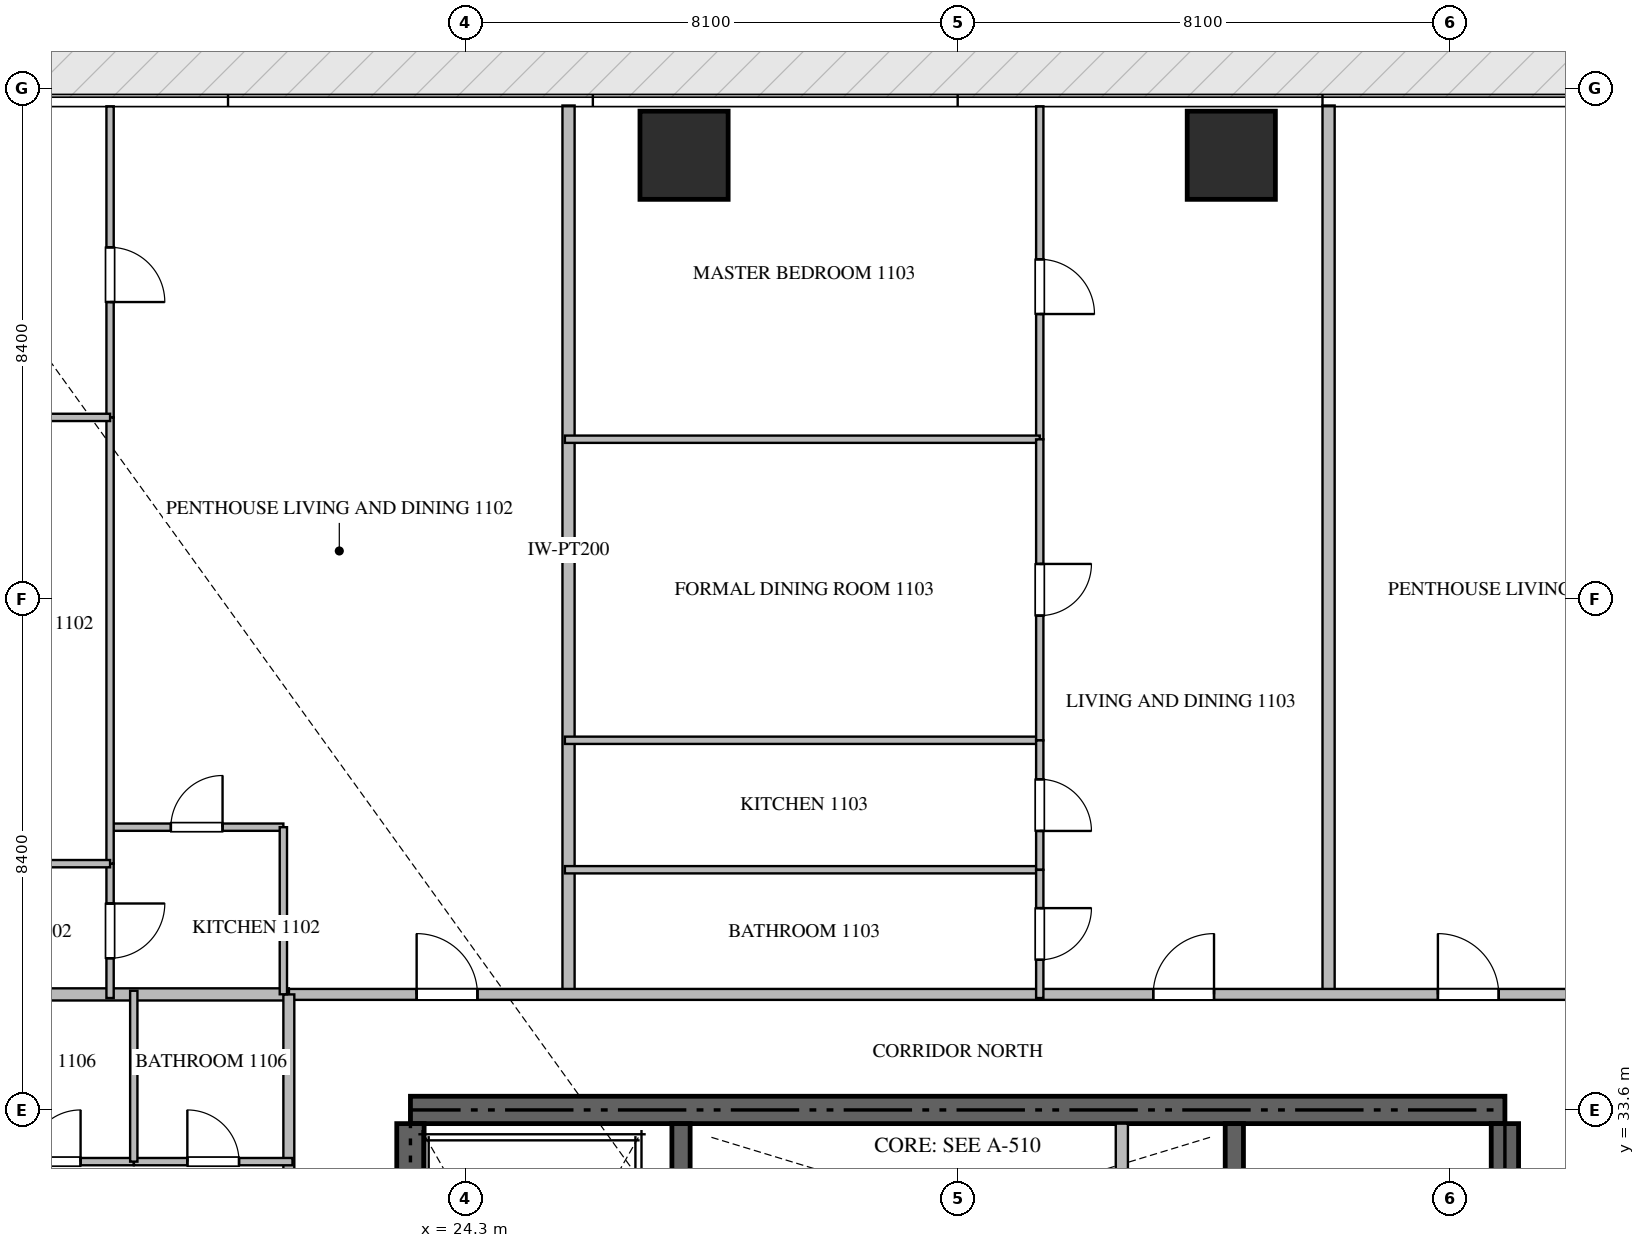
"""IFC4 building model, lengths in metres.
Left out: names, types, materials, properties, quantities, classifications, styles, units other than length and angle.
Written with IfcOpenShell. Run it as: python <this file> out.ifc"""

import sys

from ifc_helpers import new_model, si_unit, direction, frame, frame_2d, origin, origin_2d, place, context, subcontext, project, spatial, rectangle, extrude, source, transform, mapped, element, fill, save


model = new_model("IFC4")
c1 = context("Model", 3, precision=1e-05, world=origin(), true_north=direction((0.0, 1.0)))
c2 = subcontext(c1, "Body", "Model", "MODEL_VIEW")
j1 = project(units=[si_unit("LENGTHUNIT", "METRE"), si_unit("PLANEANGLEUNIT", "RADIAN")], contexts=[c1])
p1 = place(None, origin())
s1 = spatial("IfcSite", under=j1, at=p1, CompositionType="ELEMENT")
p2 = place(p1, origin())
s2 = spatial("IfcBuilding", under=s1, at=p2, CompositionType="ELEMENT")
p3 = place(p2, frame((0.0, 0.0, 49.2)))
s3 = spatial("IfcBuildingStorey", under=s2, at=p3, CompositionType="ELEMENT", Elevation=49.2)
p4 = place(p3, frame((41.4, 33.6, -0.26), z_axis=(0.0, 0.0, 1.0), x_axis=(-1.0, 0.0, 0.0)))
e1 = element("IfcWall", 1, at=p4, inside=s3, PredefinedType="SHEAR", context=c2, shape_type="SweptSolid", body=[
    extrude(rectangle(XDim=18.0, YDim=0.45, at=frame_2d((9.0, 0.0))), origin(), (0.0, 0.0, 1.0), 3.748),
])
p5 = place(p3, frame((23.4, 24.25, -0.26), z_axis=(0.0, 0.0, 1.0), x_axis=(0.0, 1.0, 0.0)))
e2 = element("IfcWall", 2, at=p5, inside=s3, PredefinedType="SHEAR", context=c2, shape_type="SweptSolid", body=[
    extrude(rectangle(XDim=9.125, YDim=0.45, at=frame_2d((4.562, 0.0))), origin(), (0.0, 0.0, 1.0), 3.748),
])
p6 = place(p3, frame((41.4, 27.75, -0.26), z_axis=(0.0, 0.0, 1.0), x_axis=(0.0, 1.0, 0.0)))
e3 = element("IfcWall", 3, at=p6, inside=s3, PredefinedType="SHEAR", context=c2, shape_type="SweptSolid", body=[
    extrude(rectangle(XDim=5.625, YDim=0.45, at=frame_2d((2.812, 0.0))), origin(), (0.0, 0.0, 1.0), 3.748),
])
p7 = place(p3, frame((27.85, 23.55, -0.26), z_axis=(0.0, 0.0, 1.0), x_axis=(0.0, 1.0, 0.0)))
e4 = element("IfcWall", 4, at=p7, inside=s3, PredefinedType="SHEAR", context=c2, shape_type="SweptSolid", body=[
    extrude(rectangle(XDim=9.825, YDim=0.3, at=frame_2d((4.913, 0.0))), origin(), (0.0, 0.0, 1.0), 3.748),
])
p8 = place(p3, frame((36.95, 27.05, -0.26), z_axis=(0.0, 0.0, 1.0), x_axis=(0.0, 1.0, 0.0)))
e5 = element("IfcWall", 5, at=p8, inside=s3, PredefinedType="SHEAR", context=c2, shape_type="SweptSolid", body=[
    extrude(rectangle(XDim=6.325, YDim=0.3, at=frame_2d((3.163, 0.0))), origin(), (0.0, 0.0, 1.0), 3.748),
])
m1 = source(origin(), c2, "Body", "SweptSolid", [
    extrude(rectangle(XDim=1.45, YDim=1.45, at=origin_2d()), origin(), (0.0, 0.0, 1.0), 3.75),
])
for number, where, z_axis, x_axis in (
    (6, (27.9, 49.3, -0.26), (0.0, 0.0, 1.0), (1.0, 0.0, 0.0)),
    (7, (36.9, 49.3, -0.26), (0.0, 0.0, 1.0), (1.0, 0.0, 0.0)),
):
    element("IfcColumn", number, at=place(p3, frame(where, z_axis=z_axis, x_axis=x_axis)), inside=s3, PredefinedType="COLUMN", context=c2, shape_type="MappedRepresentation", body=[
        mapped(m1, transform((0.0, 0.0, 0.0), scale=1.0)),
    ])
p9 = place(p3, frame((35.1, 30.75, 0.0), z_axis=(0.0, 0.0, 1.0), x_axis=(0.0, 1.0, 0.0)))
e8 = element("IfcWall", 8, at=p9, inside=s3, PredefinedType="STANDARD", context=c2, shape_type="SweptSolid", body=[
    extrude(rectangle(XDim=2.625, YDim=0.2, at=frame_2d((1.312, 0.0))), origin(), (0.0, 0.0, 1.0), 3.49),
])
for number, where, z_axis, x_axis in (
    (9, (26.0, 35.5, 0.0), (0.0, 0.0, 1.0), (0.0, 1.0, 0.0)),
    (10, (38.5, 35.5, 0.0), (0.0, 0.0, 1.0), (0.0, 1.0, 0.0)),
):
    element("IfcWall", number, at=place(p3, frame(where, z_axis=z_axis, x_axis=x_axis)), inside=s3, PredefinedType="PARTITIONING", context=c2, shape_type="SweptSolid", body=[
        extrude(rectangle(XDim=14.618, YDim=0.2, at=frame_2d((7.309, 0.0))), origin(), (0.0, 0.0, 1.0), 3.49),
    ])
p10 = place(p3, frame((6.082, 35.5, 0.0), z_axis=(0.0, 0.0, 1.0), x_axis=(1.0, 0.0, 0.0)))
e11 = element("IfcWall", 11, at=p10, inside=s3, PredefinedType="PARTITIONING", context=c2, shape_type="SweptSolid", body=[
    extrude(rectangle(XDim=15.318, YDim=0.2, at=frame_2d((7.659, 0.0))), origin(), (0.0, 0.0, 1.0), 3.49),
])
p11 = place(p3, frame((21.402, 35.5, 0.0), z_axis=(0.0, 0.0, 1.0), x_axis=(1.0, 0.0, 0.0)))
e12 = element("IfcWall", 12, at=p11, inside=s3, PredefinedType="PARTITIONING", context=c2, shape_type="SweptSolid", body=[
    extrude(rectangle(XDim=21.996, YDim=0.18, at=frame_2d((10.998, 0.0))), origin(), (0.0, 0.0, 1.0), 3.49),
])
p12 = place(p11, frame((2.1, 0.0, 0.0)))
e13 = element("IfcOpeningElement", 13, at=p12, cuts=e12, PredefinedType="OPENING", context=c2, shape_type="SweptSolid", body=[
    extrude(rectangle(XDim=1.0, YDim=2.15, at=frame_2d((0.5, 1.075))), frame((0.0, 0.1, 0.0), z_axis=(0.0, -1.0, 0.0), x_axis=(1.0, 0.0, 0.0)), (0.0, 0.0, 1.0), 0.2),
])
p13 = place(p11, frame((14.214, 0.0, 0.0)))
e14 = element("IfcOpeningElement", 14, at=p13, cuts=e12, PredefinedType="OPENING", context=c2, shape_type="SweptSolid", body=[
    extrude(rectangle(XDim=1.0, YDim=2.15, at=frame_2d((0.5, 1.075))), frame((0.0, 0.1, 0.0), z_axis=(0.0, -1.0, 0.0), x_axis=(1.0, 0.0, 0.0)), (0.0, 0.0, 1.0), 0.2),
])
p14 = place(p11, frame((18.896, 0.0, 0.0)))
e15 = element("IfcOpeningElement", 15, at=p14, cuts=e12, PredefinedType="OPENING", context=c2, shape_type="SweptSolid", body=[
    extrude(rectangle(XDim=1.0, YDim=2.15, at=frame_2d((0.5, 1.075))), frame((0.0, 0.1, 0.0), z_axis=(0.0, -1.0, 0.0), x_axis=(1.0, 0.0, 0.0)), (0.0, 0.0, 1.0), 0.2),
])
p15 = place(p3, frame((21.4, 14.9, 0.0), z_axis=(0.0, 0.0, 1.0), x_axis=(0.0, 1.0, 0.0)))
e16 = element("IfcWall", 16, at=p15, inside=s3, PredefinedType="PARTITIONING", context=c2, shape_type="SweptSolid", body=[
    extrude(rectangle(XDim=20.6, YDim=0.18, at=frame_2d((10.3, 0.0))), origin(), (0.0, 0.0, 1.0), 3.49),
])
p16 = place(p15, frame((8.8, 0.0, 0.0)))
e17 = element("IfcOpeningElement", 17, at=p16, cuts=e16, PredefinedType="OPENING", context=c2, shape_type="SweptSolid", body=[
    extrude(rectangle(XDim=1.0, YDim=2.15, at=frame_2d((0.5, 1.075))), frame((0.0, 0.1, 0.0), z_axis=(0.0, -1.0, 0.0), x_axis=(1.0, 0.0, 0.0)), (0.0, 0.0, 1.0), 0.2),
])
p17 = place(p15, frame((13.877, 0.0, 0.0)))
e18 = element("IfcOpeningElement", 18, at=p17, cuts=e16, PredefinedType="OPENING", context=c2, shape_type="SweptSolid", body=[
    extrude(rectangle(XDim=1.0, YDim=2.15, at=frame_2d((0.5, 1.075))), frame((0.0, 0.1, 0.0), z_axis=(0.0, -1.0, 0.0), x_axis=(1.0, 0.0, 0.0)), (0.0, 0.0, 1.0), 0.2),
])
p18 = place(p3, frame((18.46, 38.25, 0.0), z_axis=(0.0, 0.0, 1.0), x_axis=(1.0, 0.0, 0.0)))
e19 = element("IfcWall", 19, at=p18, inside=s3, PredefinedType="PARTITIONING", context=c2, shape_type="SweptSolid", body=[
    extrude(rectangle(XDim=2.85, YDim=0.12, at=frame_2d((1.425, 0.0))), origin(), (0.0, 0.0, 1.0), 3.49),
])
p19 = place(p18, frame((1.0, 0.0, 0.0)))
e20 = element("IfcOpeningElement", 20, at=p19, cuts=e19, PredefinedType="OPENING", context=c2, shape_type="SweptSolid", body=[
    extrude(rectangle(XDim=0.85, YDim=2.1, at=frame_2d((0.425, 1.05))), frame((0.0, 0.07, 0.0), z_axis=(0.0, -1.0, 0.0), x_axis=(1.0, 0.0, 0.0)), (0.0, 0.0, 1.0), 0.14),
])
p20 = place(p3, frame((21.31, 38.25, 0.0), z_axis=(0.0, 0.0, 1.0), x_axis=(0.0, -1.0, 0.0)))
e21 = element("IfcWall", 21, at=p20, inside=s3, PredefinedType="PARTITIONING", context=c2, shape_type="SweptSolid", body=[
    extrude(rectangle(XDim=2.748, YDim=0.12, at=frame_2d((1.374, 0.0))), origin(), (0.0, 0.0, 1.0), 3.49),
])
p21 = place(p3, frame((18.46, 37.65, 0.0), z_axis=(0.0, 0.0, 1.0), x_axis=(0.0, -1.0, 0.0)))
e22 = element("IfcWall", 22, at=p21, inside=s3, PredefinedType="PARTITIONING", context=c2, shape_type="SweptSolid", body=[
    extrude(rectangle(XDim=2.21, YDim=0.12, at=frame_2d((1.105, 0.0))), origin(), (0.0, 0.0, 1.0), 3.49),
])
p22 = place(p21, frame((0.655, 0.0, 0.0)))
e23 = element("IfcOpeningElement", 23, at=p22, cuts=e22, PredefinedType="OPENING", context=c2, shape_type="SweptSolid", body=[
    extrude(rectangle(XDim=0.9, YDim=2.1, at=frame_2d((0.45, 1.05))), frame((0.0, 0.07, 0.0), z_axis=(0.0, -1.0, 0.0), x_axis=(1.0, 0.0, 0.0)), (0.0, 0.0, 1.0), 0.14),
])
p23 = place(p3, frame((18.46, 50.105, 0.0), z_axis=(0.0, 0.0, 1.0), x_axis=(0.0, -1.0, 0.0)))
e24 = element("IfcWall", 24, at=p23, inside=s3, PredefinedType="PARTITIONING", context=c2, shape_type="SweptSolid", body=[
    extrude(rectangle(XDim=5.116, YDim=0.12, at=frame_2d((2.558, 0.0))), origin(), (0.0, 0.0, 1.0), 3.49),
])
p24 = place(p23, frame((2.319, 0.0, 0.0)))
e25 = element("IfcOpeningElement", 25, at=p24, cuts=e24, PredefinedType="OPENING", context=c2, shape_type="SweptSolid", body=[
    extrude(rectangle(XDim=0.9, YDim=2.1, at=frame_2d((0.45, 1.05))), frame((0.0, 0.07, 0.0), z_axis=(0.0, -1.0, 0.0), x_axis=(1.0, 0.0, 0.0)), (0.0, 0.0, 1.0), 0.14),
])
p25 = place(p3, frame((18.46, 44.987, 0.0), z_axis=(0.0, 0.0, 1.0), x_axis=(0.0, -1.0, 0.0)))
e26 = element("IfcWall", 26, at=p25, inside=s3, PredefinedType="PARTITIONING", context=c2, shape_type="SweptSolid", body=[
    extrude(rectangle(XDim=7.335, YDim=0.12, at=frame_2d((3.667, 0.0))), origin(), (0.0, 0.0, 1.0), 3.49),
])
p26 = place(p3, frame((13.31, 44.989, 0.0), z_axis=(0.0, 0.0, 1.0), x_axis=(1.0, 0.0, 0.0)))
e27 = element("IfcWall", 27, at=p26, inside=s3, PredefinedType="PARTITIONING", context=c2, shape_type="SweptSolid", body=[
    extrude(rectangle(XDim=5.15, YDim=0.12, at=frame_2d((2.575, 0.0))), origin(), (0.0, 0.0, 1.0), 3.49),
])
p27 = place(p3, frame((15.412, 37.65, 0.0), z_axis=(0.0, 0.0, 1.0), x_axis=(1.0, 0.0, 0.0)))
e28 = element("IfcWall", 28, at=p27, inside=s3, PredefinedType="PARTITIONING", context=c2, shape_type="SweptSolid", body=[
    extrude(rectangle(XDim=3.048, YDim=0.12, at=frame_2d((1.524, 0.0))), origin(), (0.0, 0.0, 1.0), 3.49),
])
p28 = place(p27, frame((1.099, 0.0, 0.0)))
e29 = element("IfcOpeningElement", 29, at=p28, cuts=e28, PredefinedType="OPENING", context=c2, shape_type="SweptSolid", body=[
    extrude(rectangle(XDim=0.85, YDim=2.1, at=frame_2d((0.425, 1.05))), frame((0.0, 0.07, 0.0), z_axis=(0.0, -1.0, 0.0), x_axis=(1.0, 0.0, 0.0)), (0.0, 0.0, 1.0), 0.14),
])
p29 = place(p3, frame((33.75, 50.105, 0.0), z_axis=(0.0, 0.0, 1.0), x_axis=(0.0, -1.0, 0.0)))
e30 = element("IfcWall", 30, at=p29, inside=s3, PredefinedType="PARTITIONING", context=c2, shape_type="SweptSolid", body=[
    extrude(rectangle(XDim=5.475, YDim=0.12, at=frame_2d((2.738, 0.0))), origin(), (0.0, 0.0, 1.0), 3.49),
])
p30 = place(p29, frame((2.516, 0.0, 0.0)))
e31 = element("IfcOpeningElement", 31, at=p30, cuts=e30, PredefinedType="OPENING", context=c2, shape_type="SweptSolid", body=[
    extrude(rectangle(XDim=0.9, YDim=2.1, at=frame_2d((0.45, 1.05))), frame((0.0, 0.07, 0.0), z_axis=(0.0, -1.0, 0.0), x_axis=(1.0, 0.0, 0.0)), (0.0, 0.0, 1.0), 0.14),
])
for number, where, z_axis, x_axis in (
    (32, (25.94, 44.63, 0.0), (0.0, 0.0, 1.0), (1.0, 0.0, 0.0)),
    (33, (25.94, 39.679, 0.0), (0.0, 0.0, 1.0), (1.0, 0.0, 0.0)),
    (34, (25.94, 37.55, 0.0), (0.0, 0.0, 1.0), (1.0, 0.0, 0.0)),
):
    element("IfcWall", number, at=place(p3, frame(where, z_axis=z_axis, x_axis=x_axis)), inside=s3, PredefinedType="PARTITIONING", context=c2, shape_type="SweptSolid", body=[
        extrude(rectangle(XDim=7.81, YDim=0.12, at=frame_2d((3.905, 0.0))), origin(), (0.0, 0.0, 1.0), 3.49),
    ])
p31 = place(p3, frame((33.75, 44.628, 0.0), z_axis=(0.0, 0.0, 1.0), x_axis=(0.0, -1.0, 0.0)))
e35 = element("IfcWall", 35, at=p31, inside=s3, PredefinedType="PARTITIONING", context=c2, shape_type="SweptSolid", body=[
    extrude(rectangle(XDim=4.949, YDim=0.12, at=frame_2d((2.475, 0.0))), origin(), (0.0, 0.0, 1.0), 3.49),
])
p32 = place(p31, frame((2.049, 0.0, 0.0)))
e36 = element("IfcOpeningElement", 36, at=p32, cuts=e35, PredefinedType="OPENING", context=c2, shape_type="SweptSolid", body=[
    extrude(rectangle(XDim=0.85, YDim=2.1, at=frame_2d((0.425, 1.05))), frame((0.0, 0.07, 0.0), z_axis=(0.0, -1.0, 0.0), x_axis=(1.0, 0.0, 0.0)), (0.0, 0.0, 1.0), 0.14),
])
p33 = place(p3, frame((33.75, 39.677, 0.0), z_axis=(0.0, 0.0, 1.0), x_axis=(0.0, -1.0, 0.0)))
e37 = element("IfcWall", 37, at=p33, inside=s3, PredefinedType="PARTITIONING", context=c2, shape_type="SweptSolid", body=[
    extrude(rectangle(XDim=2.127, YDim=0.12, at=frame_2d((1.063, 0.0))), origin(), (0.0, 0.0, 1.0), 3.49),
])
p34 = place(p33, frame((0.639, 0.0, 0.0)))
e38 = element("IfcOpeningElement", 38, at=p34, cuts=e37, PredefinedType="OPENING", context=c2, shape_type="SweptSolid", body=[
    extrude(rectangle(XDim=0.85, YDim=2.1, at=frame_2d((0.425, 1.05))), frame((0.0, 0.07, 0.0), z_axis=(0.0, -1.0, 0.0), x_axis=(1.0, 0.0, 0.0)), (0.0, 0.0, 1.0), 0.14),
])
p35 = place(p3, frame((33.75, 37.548, 0.0), z_axis=(0.0, 0.0, 1.0), x_axis=(0.0, -1.0, 0.0)))
e39 = element("IfcWall", 39, at=p35, inside=s3, PredefinedType="PARTITIONING", context=c2, shape_type="SweptSolid", body=[
    extrude(rectangle(XDim=2.108, YDim=0.12, at=frame_2d((1.054, 0.0))), origin(), (0.0, 0.0, 1.0), 3.49),
])
p36 = place(p35, frame((0.629, 0.0, 0.0)))
e40 = element("IfcOpeningElement", 40, at=p36, cuts=e39, PredefinedType="OPENING", context=c2, shape_type="SweptSolid", body=[
    extrude(rectangle(XDim=0.85, YDim=2.1, at=frame_2d((0.425, 1.05))), frame((0.0, 0.07, 0.0), z_axis=(0.0, -1.0, 0.0), x_axis=(1.0, 0.0, 0.0)), (0.0, 0.0, 1.0), 0.14),
])
p37 = place(p3, frame((16.25, 32.75, 0.0), z_axis=(0.0, 0.0, 1.0), x_axis=(1.0, 0.0, 0.0)))
e41 = element("IfcWall", 41, at=p37, inside=s3, PredefinedType="PARTITIONING", context=c2, shape_type="SweptSolid", body=[
    extrude(rectangle(XDim=2.6, YDim=0.12, at=frame_2d((1.3, 0.0))), origin(), (0.0, 0.0, 1.0), 3.49),
])
p38 = place(p37, frame((0.875, 0.0, 0.0)))
e42 = element("IfcOpeningElement", 42, at=p38, cuts=e41, PredefinedType="OPENING", context=c2, shape_type="SweptSolid", body=[
    extrude(rectangle(XDim=0.85, YDim=2.1, at=frame_2d((0.425, 1.05))), frame((0.0, 0.07, 0.0), z_axis=(0.0, -1.0, 0.0), x_axis=(1.0, 0.0, 0.0)), (0.0, 0.0, 1.0), 0.14),
])
p39 = place(p3, frame((18.852, 32.75, 0.0), z_axis=(0.0, 0.0, 1.0), x_axis=(1.0, 0.0, 0.0)))
e43 = element("IfcWall", 43, at=p39, inside=s3, PredefinedType="PARTITIONING", context=c2, shape_type="SweptSolid", body=[
    extrude(rectangle(XDim=2.608, YDim=0.12, at=frame_2d((1.304, 0.0))), origin(), (0.0, 0.0, 1.0), 3.49),
])
p40 = place(p39, frame((0.879, 0.0, 0.0)))
e44 = element("IfcOpeningElement", 44, at=p40, cuts=e43, PredefinedType="OPENING", context=c2, shape_type="SweptSolid", body=[
    extrude(rectangle(XDim=0.85, YDim=2.1, at=frame_2d((0.425, 1.05))), frame((0.0, 0.07, 0.0), z_axis=(0.0, -1.0, 0.0), x_axis=(1.0, 0.0, 0.0)), (0.0, 0.0, 1.0), 0.14),
])
p41 = place(p3, frame((18.85, 32.75, 0.0), z_axis=(0.0, 0.0, 1.0), x_axis=(0.0, 1.0, 0.0)))
e45 = element("IfcWall", 45, at=p41, inside=s3, PredefinedType="PARTITIONING", context=c2, shape_type="SweptSolid", body=[
    extrude(rectangle(XDim=2.81, YDim=0.12, at=frame_2d((1.405, 0.0))), origin(), (0.0, 0.0, 1.0), 3.49),
])
m2 = source(origin(), c2, "Body", "SweptSolid", [
    extrude(rectangle(XDim=1.0, YDim=2.15, at=frame_2d((0.5, 1.075))), frame((0.0, 0.025, 0.0), z_axis=(0.0, -1.0, 0.0), x_axis=(1.0, 0.0, 0.0)), (0.0, 0.0, 1.0), 0.05),
])
p42 = place(p12, origin())
e46 = element("IfcDoor", 46, at=p42, inside=s3, OperationType="SINGLE_SWING_LEFT", PredefinedType="DOOR", context=c2, shape_type="MappedRepresentation", body=[
    mapped(m2, transform((0.0, 0.0, 0.0), scale=1.0)),
])
fill(e13, e46)
p43 = place(p13, origin())
e47 = element("IfcDoor", 47, at=p43, inside=s3, OperationType="SINGLE_SWING_RIGHT", PredefinedType="DOOR", context=c2, shape_type="MappedRepresentation", body=[
    mapped(m2, transform((0.0, 0.0, 0.0), scale=1.0)),
])
fill(e14, e47)
p44 = place(p14, origin())
e48 = element("IfcDoor", 48, at=p44, inside=s3, OperationType="SINGLE_SWING_LEFT", PredefinedType="DOOR", context=c2, shape_type="MappedRepresentation", body=[
    mapped(m2, transform((0.0, 0.0, 0.0), scale=1.0)),
])
fill(e15, e48)
m3 = source(origin(), c2, "Body", "SweptSolid", [
    extrude(rectangle(XDim=0.85, YDim=2.1, at=frame_2d((0.425, 1.05))), frame((0.0, 0.025, 0.0), z_axis=(0.0, -1.0, 0.0), x_axis=(1.0, 0.0, 0.0)), (0.0, 0.0, 1.0), 0.05),
])
p45 = place(p19, origin())
e49 = element("IfcDoor", 49, at=p45, inside=s3, OperationType="SINGLE_SWING_RIGHT", PredefinedType="DOOR", context=c2, shape_type="MappedRepresentation", body=[
    mapped(m3, transform((0.0, 0.0, 0.0), scale=1.0)),
])
fill(e20, e49)
m4 = source(origin(), c2, "Body", "SweptSolid", [
    extrude(rectangle(XDim=0.9, YDim=2.1, at=frame_2d((0.45, 1.05))), frame((0.0, 0.025, 0.0), z_axis=(0.0, -1.0, 0.0), x_axis=(1.0, 0.0, 0.0)), (0.0, 0.0, 1.0), 0.05),
])
p46 = place(p22, origin())
e50 = element("IfcDoor", 50, at=p46, inside=s3, OperationType="SINGLE_SWING_LEFT", PredefinedType="DOOR", context=c2, shape_type="MappedRepresentation", body=[
    mapped(m4, transform((0.0, 0.0, 0.0), scale=1.0)),
])
fill(e23, e50)
p47 = place(p24, origin())
e51 = element("IfcDoor", 51, at=p47, inside=s3, OperationType="SINGLE_SWING_RIGHT", PredefinedType="DOOR", context=c2, shape_type="MappedRepresentation", body=[
    mapped(m4, transform((0.0, 0.0, 0.0), scale=1.0)),
])
fill(e25, e51)
p48 = place(p30, origin())
e52 = element("IfcDoor", 52, at=p48, inside=s3, OperationType="SINGLE_SWING_RIGHT", PredefinedType="DOOR", context=c2, shape_type="MappedRepresentation", body=[
    mapped(m4, transform((0.0, 0.0, 0.0), scale=1.0)),
])
fill(e31, e52)
p49 = place(p32, origin())
e53 = element("IfcDoor", 53, at=p49, inside=s3, OperationType="SINGLE_SWING_LEFT", PredefinedType="DOOR", context=c2, shape_type="MappedRepresentation", body=[
    mapped(m3, transform((0.0, 0.0, 0.0), scale=1.0)),
])
fill(e36, e53)
p50 = place(p34, origin())
e54 = element("IfcDoor", 54, at=p50, inside=s3, OperationType="SINGLE_SWING_RIGHT", PredefinedType="DOOR", context=c2, shape_type="MappedRepresentation", body=[
    mapped(m3, transform((0.0, 0.0, 0.0), scale=1.0)),
])
fill(e38, e54)
p51 = place(p36, origin())
e55 = element("IfcDoor", 55, at=p51, inside=s3, OperationType="SINGLE_SWING_LEFT", PredefinedType="DOOR", context=c2, shape_type="MappedRepresentation", body=[
    mapped(m3, transform((0.0, 0.0, 0.0), scale=1.0)),
])
fill(e40, e55)
p52 = place(p38, origin())
e56 = element("IfcDoor", 56, at=p52, inside=s3, OperationType="SINGLE_SWING_RIGHT", PredefinedType="DOOR", context=c2, shape_type="MappedRepresentation", body=[
    mapped(m3, transform((0.0, 0.0, 0.0), scale=1.0)),
])
fill(e42, e56)
p53 = place(p40, origin())
e57 = element("IfcDoor", 57, at=p53, inside=s3, OperationType="SINGLE_SWING_LEFT", PredefinedType="DOOR", context=c2, shape_type="MappedRepresentation", body=[
    mapped(m3, transform((0.0, 0.0, 0.0), scale=1.0)),
])
fill(e44, e57)
save(model, sys.argv[1])
